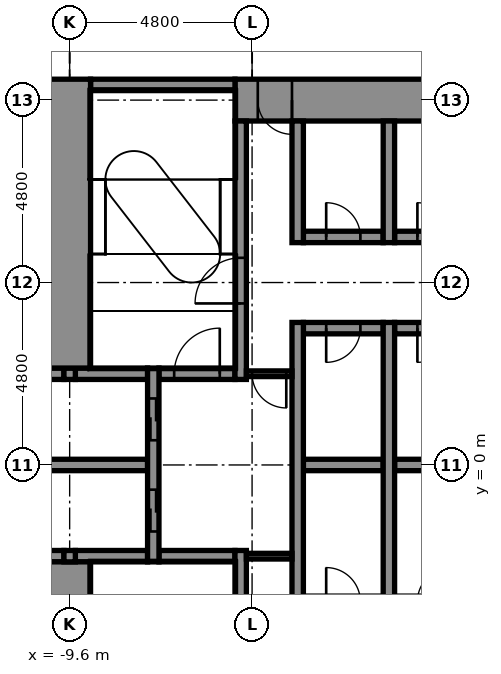
"""IFC4 building model, lengths in metres.
Left out: names, types, materials, properties, quantities, classifications, styles, units other than length and angle.
Written with IfcOpenShell. Run it as: python <this file> out.ifc"""

import sys

from ifc_helpers import new_model, si_unit, direction, frame, frame_2d, origin, place, context, subcontext, project, spatial, rectangle, extrude, element, fill, save


model = new_model("IFC4")
c1 = context("Model", 3, precision=1e-05, world=origin(), true_north=direction((0.0, 1.0)))
c2 = subcontext(c1, "Body", "Model", "MODEL_VIEW")
j1 = project(units=[si_unit("LENGTHUNIT", "METRE"), si_unit("PLANEANGLEUNIT", "RADIAN")], contexts=[c1])
p1 = place(None, origin())
s1 = spatial("IfcSite", under=j1, at=p1, CompositionType="ELEMENT")
p2 = place(p1, origin())
s2 = spatial("IfcBuilding", under=s1, at=p2, CompositionType="ELEMENT")
p3 = place(p2, frame((0.0, 0.0, 44.4)))
s3 = spatial("IfcBuildingStorey", under=s2, at=p3, CompositionType="ELEMENT", Elevation=44.4)
p4 = place(p3, frame((-10.85, -2.4, -0.25), z_axis=(0.0, 0.0, 1.0), x_axis=(1.0, 0.0, 0.0)))
e1 = element("IfcWall", 1, at=p4, inside=s3, PredefinedType="STANDARD", context=c2, shape_type="SweptSolid", body=[
    extrude(rectangle(XDim=1.1, YDim=0.3, at=frame_2d((0.55, 0.0))), origin(), (0.0, 0.0, 1.0), 5.5),
])
p5 = place(p3, frame((-9.45, -2.4, -0.25), z_axis=(0.0, 0.0, 1.0), x_axis=(1.0, 0.0, 0.0)))
e2 = element("IfcWall", 2, at=p5, inside=s3, PredefinedType="STANDARD", context=c2, shape_type="SweptSolid", body=[
    extrude(rectangle(XDim=1.9, YDim=0.3, at=frame_2d((0.95, 0.0))), origin(), (0.0, 0.0, 1.0), 5.5),
])
p6 = place(p3, frame((-7.25, -2.4, -0.25), z_axis=(0.0, 0.0, 1.0), x_axis=(1.0, 0.0, 0.0)))
e3 = element("IfcWall", 3, at=p6, inside=s3, PredefinedType="STANDARD", context=c2, shape_type="SweptSolid", body=[
    extrude(rectangle(XDim=2.0, YDim=0.3, at=frame_2d((1.0, 0.0))), origin(), (0.0, 0.0, 1.0), 5.5),
])
p7 = place(p3, frame((-10.85, 0.0, -0.25), z_axis=(0.0, 0.0, 1.0), x_axis=(1.0, 0.0, 0.0)))
e4 = element("IfcWall", 4, at=p7, inside=s3, PredefinedType="STANDARD", context=c2, shape_type="SweptSolid", body=[
    extrude(rectangle(XDim=3.3, YDim=0.3, at=frame_2d((1.65, 0.0))), origin(), (0.0, 0.0, 1.0), 5.5),
])
p8 = place(p3, frame((-3.45, 0.0, -0.25), z_axis=(0.0, 0.0, 1.0), x_axis=(1.0, 0.0, 0.0)))
e5 = element("IfcWall", 5, at=p8, inside=s3, PredefinedType="STANDARD", context=c2, shape_type="SweptSolid", body=[
    extrude(rectangle(XDim=2.1, YDim=0.3, at=frame_2d((1.05, 0.0))), origin(), (0.0, 0.0, 1.0), 5.5),
])
p9 = place(p3, frame((-1.05, 0.0, -0.25), z_axis=(0.0, 0.0, 1.0), x_axis=(1.0, 0.0, 0.0)))
e6 = element("IfcWall", 6, at=p9, inside=s3, PredefinedType="STANDARD", context=c2, shape_type="SweptSolid", body=[
    extrude(rectangle(XDim=2.1, YDim=0.3, at=frame_2d((1.05, 0.0))), origin(), (0.0, 0.0, 1.0), 5.5),
])
p10 = place(p3, frame((-10.85, 2.4, -0.25), z_axis=(0.0, 0.0, 1.0), x_axis=(1.0, 0.0, 0.0)))
e7 = element("IfcWall", 7, at=p10, inside=s3, PredefinedType="STANDARD", context=c2, shape_type="SweptSolid", body=[
    extrude(rectangle(XDim=1.1, YDim=0.3, at=frame_2d((0.55, 0.0))), origin(), (0.0, 0.0, 1.0), 5.5),
])
p11 = place(p3, frame((-9.45, 2.4, -0.25), z_axis=(0.0, 0.0, 1.0), x_axis=(1.0, 0.0, 0.0)))
e8 = element("IfcWall", 8, at=p11, inside=s3, PredefinedType="STANDARD", context=c2, shape_type="SweptSolid", body=[
    extrude(rectangle(XDim=1.9, YDim=0.3, at=frame_2d((0.95, 0.0))), origin(), (0.0, 0.0, 1.0), 5.5),
])
p12 = place(p3, frame((-7.25, 2.4, -0.25), z_axis=(0.0, 0.0, 1.0), x_axis=(1.0, 0.0, 0.0)))
e9 = element("IfcWall", 9, at=p12, inside=s3, PredefinedType="STANDARD", context=c2, shape_type="SweptSolid", body=[
    extrude(rectangle(XDim=2.0, YDim=0.3, at=frame_2d((1.0, 0.0))), origin(), (0.0, 0.0, 1.0), 5.5),
])
p13 = place(p12, frame((0.4, 0.0, 0.25)))
e10 = element("IfcOpeningElement", 10, at=p13, cuts=e9, PredefinedType="OPENING", context=c2, shape_type="SweptSolid", body=[
    extrude(rectangle(XDim=1.2, YDim=2.1, at=frame_2d((0.6, 1.05))), frame((0.0, 0.16, 0.0), z_axis=(0.0, -1.0, 0.0), x_axis=(1.0, 0.0, 0.0)), (0.0, 0.0, 1.0), 0.32),
])
p14 = place(p3, frame((-3.45, 3.6, -0.25), z_axis=(0.0, 0.0, 1.0), x_axis=(1.0, 0.0, 0.0)))
e11 = element("IfcWall", 11, at=p14, inside=s3, PredefinedType="STANDARD", context=c2, shape_type="SweptSolid", body=[
    extrude(rectangle(XDim=2.1, YDim=0.3, at=frame_2d((1.05, 0.0))), origin(), (0.0, 0.0, 1.0), 5.5),
])
p15 = place(p14, frame((0.6, 0.0, 0.25)))
e12 = element("IfcOpeningElement", 12, at=p15, cuts=e11, PredefinedType="OPENING", context=c2, shape_type="SweptSolid", body=[
    extrude(rectangle(XDim=0.9, YDim=2.1, at=frame_2d((0.45, 1.05))), frame((0.0, 0.16, 0.0), z_axis=(0.0, -1.0, 0.0), x_axis=(1.0, 0.0, 0.0)), (0.0, 0.0, 1.0), 0.32),
])
p16 = place(p3, frame((-1.05, 3.6, -0.25), z_axis=(0.0, 0.0, 1.0), x_axis=(1.0, 0.0, 0.0)))
e13 = element("IfcWall", 13, at=p16, inside=s3, PredefinedType="STANDARD", context=c2, shape_type="SweptSolid", body=[
    extrude(rectangle(XDim=2.1, YDim=0.3, at=frame_2d((1.05, 0.0))), origin(), (0.0, 0.0, 1.0), 5.5),
])
p17 = place(p16, frame((0.6, 0.0, 0.25)))
e14 = element("IfcOpeningElement", 14, at=p17, cuts=e13, PredefinedType="OPENING", context=c2, shape_type="SweptSolid", body=[
    extrude(rectangle(XDim=0.9, YDim=2.1, at=frame_2d((0.45, 1.05))), frame((0.0, 0.16, 0.0), z_axis=(0.0, -1.0, 0.0), x_axis=(1.0, 0.0, 0.0)), (0.0, 0.0, 1.0), 0.32),
])
p18 = place(p3, frame((-3.45, 6.0, -0.25), z_axis=(0.0, 0.0, 1.0), x_axis=(1.0, 0.0, 0.0)))
e15 = element("IfcWall", 15, at=p18, inside=s3, PredefinedType="STANDARD", context=c2, shape_type="SweptSolid", body=[
    extrude(rectangle(XDim=2.1, YDim=0.3, at=frame_2d((1.05, 0.0))), origin(), (0.0, 0.0, 1.0), 5.5),
])
p19 = place(p18, frame((0.6, 0.0, 0.25)))
e16 = element("IfcOpeningElement", 16, at=p19, cuts=e15, PredefinedType="OPENING", context=c2, shape_type="SweptSolid", body=[
    extrude(rectangle(XDim=0.9, YDim=2.1, at=frame_2d((0.45, 1.05))), frame((0.0, 0.16, 0.0), z_axis=(0.0, -1.0, 0.0), x_axis=(1.0, 0.0, 0.0)), (0.0, 0.0, 1.0), 0.32),
])
p20 = place(p3, frame((-1.05, 6.0, -0.25), z_axis=(0.0, 0.0, 1.0), x_axis=(1.0, 0.0, 0.0)))
e17 = element("IfcWall", 17, at=p20, inside=s3, PredefinedType="STANDARD", context=c2, shape_type="SweptSolid", body=[
    extrude(rectangle(XDim=2.1, YDim=0.3, at=frame_2d((1.05, 0.0))), origin(), (0.0, 0.0, 1.0), 5.5),
])
p21 = place(p20, frame((0.6, 0.0, 0.25)))
e18 = element("IfcOpeningElement", 18, at=p21, cuts=e17, PredefinedType="OPENING", context=c2, shape_type="SweptSolid", body=[
    extrude(rectangle(XDim=0.9, YDim=2.1, at=frame_2d((0.45, 1.05))), frame((0.0, 0.16, 0.0), z_axis=(0.0, -1.0, 0.0), x_axis=(1.0, 0.0, 0.0)), (0.0, 0.0, 1.0), 0.32),
])
p22 = place(p3, frame((-5.25, 9.6, -0.25), z_axis=(0.0, 0.0, 1.0), x_axis=(1.0, 0.0, 0.0)))
e19 = element("IfcWall", 19, at=p22, inside=s3, PredefinedType="SHEAR", context=c2, shape_type="SweptSolid", body=[
    extrude(rectangle(XDim=14.3, YDim=1.1, at=frame_2d((7.15, 0.0))), origin(), (0.0, 0.0, 1.0), 5.5),
])
p23 = place(p22, frame((0.6, 0.0, 0.25)))
e20 = element("IfcOpeningElement", 20, at=p23, cuts=e19, PredefinedType="OPENING", context=c2, shape_type="SweptSolid", body=[
    extrude(rectangle(XDim=0.9, YDim=2.1, at=frame_2d((0.45, 1.05))), frame((0.0, 0.56, 0.0), z_axis=(0.0, -1.0, 0.0), x_axis=(1.0, 0.0, 0.0)), (0.0, 0.0, 1.0), 1.12),
])
p24 = place(p3, frame((-9.05, 10.0, -0.25), z_axis=(0.0, 0.0, 1.0), x_axis=(1.0, 0.0, 0.0)))
e21 = element("IfcWall", 21, at=p24, inside=s3, PredefinedType="STANDARD", context=c2, shape_type="SweptSolid", body=[
    extrude(rectangle(XDim=3.8, YDim=0.3, at=frame_2d((1.9, 0.0))), origin(), (0.0, 0.0, 1.0), 5.5),
])
p25 = place(p3, frame((-9.6, -10.15, -0.25), z_axis=(0.0, 0.0, 1.0), x_axis=(0.0, 1.0, 0.0)))
e22 = element("IfcWall", 22, at=p25, inside=s3, PredefinedType="SHEAR", context=c2, shape_type="SweptSolid", body=[
    extrude(rectangle(XDim=7.6, YDim=1.1, at=frame_2d((3.8, 0.0))), origin(), (0.0, 0.0, 1.0), 5.5),
])
for number, where, z_axis, x_axis in (
    (23, (-9.6, -2.55, -0.25), (0.0, 0.0, 1.0), (0.0, 1.0, 0.0)),
    (24, (-9.6, 2.25, -0.25), (0.0, 0.0, 1.0), (0.0, 1.0, 0.0)),
):
    element("IfcWall", number, at=place(p3, frame(where, z_axis=z_axis, x_axis=x_axis)), inside=s3, PredefinedType="STANDARD", context=c2, shape_type="SweptSolid", body=[
        extrude(rectangle(XDim=0.3, YDim=0.3, at=frame_2d((0.15, 0.0))), origin(), (0.0, 0.0, 1.0), 5.5),
    ])
p26 = place(p3, frame((-9.6, 2.55, -0.25), z_axis=(0.0, 0.0, 1.0), x_axis=(0.0, 1.0, 0.0)))
e25 = element("IfcWall", 25, at=p26, inside=s3, PredefinedType="SHEAR", context=c2, shape_type="SweptSolid", body=[
    extrude(rectangle(XDim=7.6, YDim=1.1, at=frame_2d((3.8, 0.0))), origin(), (0.0, 0.0, 1.0), 5.5),
])
p27 = place(p3, frame((-7.4, -2.55, -0.25), z_axis=(0.0, 0.0, 1.0), x_axis=(0.0, 1.0, 0.0)))
e26 = element("IfcWall", 26, at=p27, inside=s3, PredefinedType="STANDARD", context=c2, shape_type="SweptSolid", body=[
    extrude(rectangle(XDim=5.1, YDim=0.3, at=frame_2d((2.55, 0.0))), origin(), (0.0, 0.0, 1.0), 5.5),
])
p28 = place(p27, frame((0.8, 0.0, 0.25)))
e27 = element("IfcOpeningElement", 27, at=p28, cuts=e26, PredefinedType="OPENING", context=c2, shape_type="SweptSolid", body=[
    extrude(rectangle(XDim=1.1, YDim=2.1, at=frame_2d((0.55, 1.05))), frame((0.0, 0.16, 0.0), z_axis=(0.0, -1.0, 0.0), x_axis=(1.0, 0.0, 0.0)), (0.0, 0.0, 1.0), 0.32),
])
p29 = place(p27, frame((3.2, 0.0, 0.25)))
e28 = element("IfcOpeningElement", 28, at=p29, cuts=e26, PredefinedType="OPENING", context=c2, shape_type="SweptSolid", body=[
    extrude(rectangle(XDim=1.1, YDim=2.1, at=frame_2d((0.55, 1.05))), frame((0.0, 0.16, 0.0), z_axis=(0.0, -1.0, 0.0), x_axis=(1.0, 0.0, 0.0)), (0.0, 0.0, 1.0), 0.32),
])
p30 = place(p3, frame((-5.1, -9.05, -0.25), z_axis=(0.0, 0.0, 1.0), x_axis=(0.0, 1.0, 0.0)))
e29 = element("IfcWall", 29, at=p30, inside=s3, PredefinedType="STANDARD", context=c2, shape_type="SweptSolid", body=[
    extrude(rectangle(XDim=6.8, YDim=0.3, at=frame_2d((3.4, 0.0))), origin(), (0.0, 0.0, 1.0), 5.5),
])
p31 = place(p30, frame((3.6, 0.0, 0.25)))
e30 = element("IfcOpeningElement", 30, at=p31, cuts=e29, PredefinedType="OPENING", context=c2, shape_type="SweptSolid", body=[
    extrude(rectangle(XDim=1.2, YDim=2.1, at=frame_2d((0.6, 1.05))), frame((0.0, 0.16, 0.0), z_axis=(0.0, -1.0, 0.0), x_axis=(1.0, 0.0, 0.0)), (0.0, 0.0, 1.0), 0.32),
])
p32 = place(p3, frame((-5.1, 2.25, -0.25), z_axis=(0.0, 0.0, 1.0), x_axis=(0.0, 1.0, 0.0)))
e31 = element("IfcWall", 31, at=p32, inside=s3, PredefinedType="STANDARD", context=c2, shape_type="SweptSolid", body=[
    extrude(rectangle(XDim=6.8, YDim=0.3, at=frame_2d((3.4, 0.0))), origin(), (0.0, 0.0, 1.0), 5.5),
])
p33 = place(p32, frame((2.0, 0.0, 0.25)))
e32 = element("IfcOpeningElement", 32, at=p33, cuts=e31, PredefinedType="OPENING", context=c2, shape_type="SweptSolid", body=[
    extrude(rectangle(XDim=1.2, YDim=2.1, at=frame_2d((0.6, 1.05))), frame((0.0, 0.16, 0.0), z_axis=(0.0, -1.0, 0.0), x_axis=(1.0, 0.0, 0.0)), (0.0, 0.0, 1.0), 0.32),
])
p34 = place(p3, frame((-3.6, -3.75, -0.25), z_axis=(0.0, 0.0, 1.0), x_axis=(0.0, 1.0, 0.0)))
e33 = element("IfcWall", 33, at=p34, inside=s3, PredefinedType="STANDARD", context=c2, shape_type="SweptSolid", body=[
    extrude(rectangle(XDim=7.5, YDim=0.3, at=frame_2d((3.75, 0.0))), origin(), (0.0, 0.0, 1.0), 5.5),
])
p35 = place(p3, frame((-3.6, 5.85, -0.25), z_axis=(0.0, 0.0, 1.0), x_axis=(0.0, 1.0, 0.0)))
e34 = element("IfcWall", 34, at=p35, inside=s3, PredefinedType="STANDARD", context=c2, shape_type="SweptSolid", body=[
    extrude(rectangle(XDim=3.2, YDim=0.3, at=frame_2d((1.6, 0.0))), origin(), (0.0, 0.0, 1.0), 5.5),
])
p36 = place(p3, frame((-1.2, -3.75, -0.25), z_axis=(0.0, 0.0, 1.0), x_axis=(0.0, 1.0, 0.0)))
e35 = element("IfcWall", 35, at=p36, inside=s3, PredefinedType="STANDARD", context=c2, shape_type="SweptSolid", body=[
    extrude(rectangle(XDim=7.5, YDim=0.3, at=frame_2d((3.75, 0.0))), origin(), (0.0, 0.0, 1.0), 5.5),
])
p37 = place(p3, frame((-1.2, 5.85, -0.25), z_axis=(0.0, 0.0, 1.0), x_axis=(0.0, 1.0, 0.0)))
e36 = element("IfcWall", 36, at=p37, inside=s3, PredefinedType="STANDARD", context=c2, shape_type="SweptSolid", body=[
    extrude(rectangle(XDim=3.2, YDim=0.3, at=frame_2d((1.6, 0.0))), origin(), (0.0, 0.0, 1.0), 5.5),
])
p38 = place(p3, frame((-4.95, 2.4, 0.0), z_axis=(0.0, 0.0, 1.0), x_axis=(1.0, 0.0, 0.0)))
e37 = element("IfcWall", 37, at=p38, inside=s3, PredefinedType="PARTITIONING", context=c2, shape_type="SweptSolid", body=[
    extrude(rectangle(XDim=1.2, YDim=0.15, at=frame_2d((0.6, 0.0))), origin(), (0.0, 0.0, 1.0), 5.25),
])
p39 = place(p38, frame((0.15, 0.0, 0.0)))
e38 = element("IfcOpeningElement", 38, at=p39, cuts=e37, PredefinedType="OPENING", context=c2, shape_type="SweptSolid", body=[
    extrude(rectangle(XDim=0.9, YDim=2.1, at=frame_2d((0.45, 1.05))), frame((0.0, 0.085, 0.0), z_axis=(0.0, -1.0, 0.0), x_axis=(1.0, 0.0, 0.0)), (0.0, 0.0, 1.0), 0.17),
])
p40 = place(p3, frame((-4.95, -2.4, 0.0), z_axis=(0.0, 0.0, 1.0), x_axis=(1.0, 0.0, 0.0)))
e39 = element("IfcWall", 39, at=p40, inside=s3, PredefinedType="PARTITIONING", context=c2, shape_type="SweptSolid", body=[
    extrude(rectangle(XDim=1.2, YDim=0.15, at=frame_2d((0.6, 0.0))), origin(), (0.0, 0.0, 1.0), 5.25),
])
p41 = place(p28, origin())
e40 = element("IfcDoor", 40, at=p41, inside=s3, OperationType="DOUBLE_DOOR_SLIDING", PredefinedType="DOOR", context=c2, shape_type="SweptSolid", body=[
    extrude(rectangle(XDim=1.1, YDim=2.1, at=frame_2d((0.55, 1.05))), frame((0.0, 0.025, 0.0), z_axis=(0.0, -1.0, 0.0), x_axis=(1.0, 0.0, 0.0)), (0.0, 0.0, 1.0), 0.05),
])
fill(e27, e40)
p42 = place(p29, origin())
e41 = element("IfcDoor", 41, at=p42, inside=s3, OperationType="DOUBLE_DOOR_SLIDING", PredefinedType="DOOR", context=c2, shape_type="SweptSolid", body=[
    extrude(rectangle(XDim=1.1, YDim=2.1, at=frame_2d((0.55, 1.05))), frame((0.0, 0.025, 0.0), z_axis=(0.0, -1.0, 0.0), x_axis=(1.0, 0.0, 0.0)), (0.0, 0.0, 1.0), 0.05),
])
fill(e28, e41)
p43 = place(p33, origin())
e42 = element("IfcDoor", 42, at=p43, inside=s3, OperationType="SINGLE_SWING_LEFT", PredefinedType="DOOR", context=c2, shape_type="SweptSolid", body=[
    extrude(rectangle(XDim=1.2, YDim=2.1, at=frame_2d((0.6, 1.05))), frame((0.0, 0.025, 0.0), z_axis=(0.0, -1.0, 0.0), x_axis=(1.0, 0.0, 0.0)), (0.0, 0.0, 1.0), 0.05),
])
fill(e32, e42)
p44 = place(p19, origin())
e43 = element("IfcDoor", 43, at=p44, inside=s3, OperationType="SINGLE_SWING_LEFT", PredefinedType="DOOR", context=c2, shape_type="SweptSolid", body=[
    extrude(rectangle(XDim=0.9, YDim=2.1, at=frame_2d((0.45, 1.05))), frame((0.0, 0.025, 0.0), z_axis=(0.0, -1.0, 0.0), x_axis=(1.0, 0.0, 0.0)), (0.0, 0.0, 1.0), 0.05),
])
fill(e16, e43)
p45 = place(p21, origin())
e44 = element("IfcDoor", 44, at=p45, inside=s3, OperationType="SINGLE_SWING_LEFT", PredefinedType="DOOR", context=c2, shape_type="SweptSolid", body=[
    extrude(rectangle(XDim=0.9, YDim=2.1, at=frame_2d((0.45, 1.05))), frame((0.0, 0.025, 0.0), z_axis=(0.0, -1.0, 0.0), x_axis=(1.0, 0.0, 0.0)), (0.0, 0.0, 1.0), 0.05),
])
fill(e18, e44)
p46 = place(p15, frame((0.9, 0.0, 0.0), z_axis=(0.0, 0.0, 1.0), x_axis=(-1.0, 0.0, 0.0)))
e45 = element("IfcDoor", 45, at=p46, inside=s3, OperationType="SINGLE_SWING_LEFT", PredefinedType="DOOR", context=c2, shape_type="SweptSolid", body=[
    extrude(rectangle(XDim=0.9, YDim=2.1, at=frame_2d((0.45, 1.05))), frame((0.0, 0.025, 0.0), z_axis=(0.0, -1.0, 0.0), x_axis=(1.0, 0.0, 0.0)), (0.0, 0.0, 1.0), 0.05),
])
fill(e12, e45)
p47 = place(p17, frame((0.9, 0.0, 0.0), z_axis=(0.0, 0.0, 1.0), x_axis=(-1.0, 0.0, 0.0)))
e46 = element("IfcDoor", 46, at=p47, inside=s3, OperationType="SINGLE_SWING_LEFT", PredefinedType="DOOR", context=c2, shape_type="SweptSolid", body=[
    extrude(rectangle(XDim=0.9, YDim=2.1, at=frame_2d((0.45, 1.05))), frame((0.0, 0.025, 0.0), z_axis=(0.0, -1.0, 0.0), x_axis=(1.0, 0.0, 0.0)), (0.0, 0.0, 1.0), 0.05),
])
fill(e14, e46)
p48 = place(p23, frame((0.9, 0.0, 0.0), z_axis=(0.0, 0.0, 1.0), x_axis=(-1.0, 0.0, 0.0)))
e47 = element("IfcDoor", 47, at=p48, inside=s3, OperationType="SINGLE_SWING_RIGHT", PredefinedType="DOOR", context=c2, shape_type="SweptSolid", body=[
    extrude(rectangle(XDim=0.9, YDim=2.1, at=frame_2d((0.45, 1.05))), frame((0.0, 0.025, 0.0), z_axis=(0.0, -1.0, 0.0), x_axis=(1.0, 0.0, 0.0)), (0.0, 0.0, 1.0), 0.05),
])
fill(e20, e47)
p49 = place(p39, frame((0.9, 0.0, 0.0), z_axis=(0.0, 0.0, 1.0), x_axis=(-1.0, 0.0, 0.0)))
e48 = element("IfcDoor", 48, at=p49, inside=s3, OperationType="SINGLE_SWING_RIGHT", PredefinedType="DOOR", context=c2, shape_type="SweptSolid", body=[
    extrude(rectangle(XDim=0.9, YDim=2.1, at=frame_2d((0.45, 1.05))), frame((0.0, 0.025, 0.0), z_axis=(0.0, -1.0, 0.0), x_axis=(1.0, 0.0, 0.0)), (0.0, 0.0, 1.0), 0.05),
])
fill(e38, e48)
p50 = place(p13, origin())
e49 = element("IfcDoor", 49, at=p50, inside=s3, OperationType="SINGLE_SWING_RIGHT", PredefinedType="DOOR", context=c2, shape_type="SweptSolid", body=[
    extrude(rectangle(XDim=1.2, YDim=2.1, at=frame_2d((0.6, 1.05))), frame((0.0, 0.025, 0.0), z_axis=(0.0, -1.0, 0.0), x_axis=(1.0, 0.0, 0.0)), (0.0, 0.0, 1.0), 0.05),
])
fill(e10, e49)
save(model, sys.argv[1])
